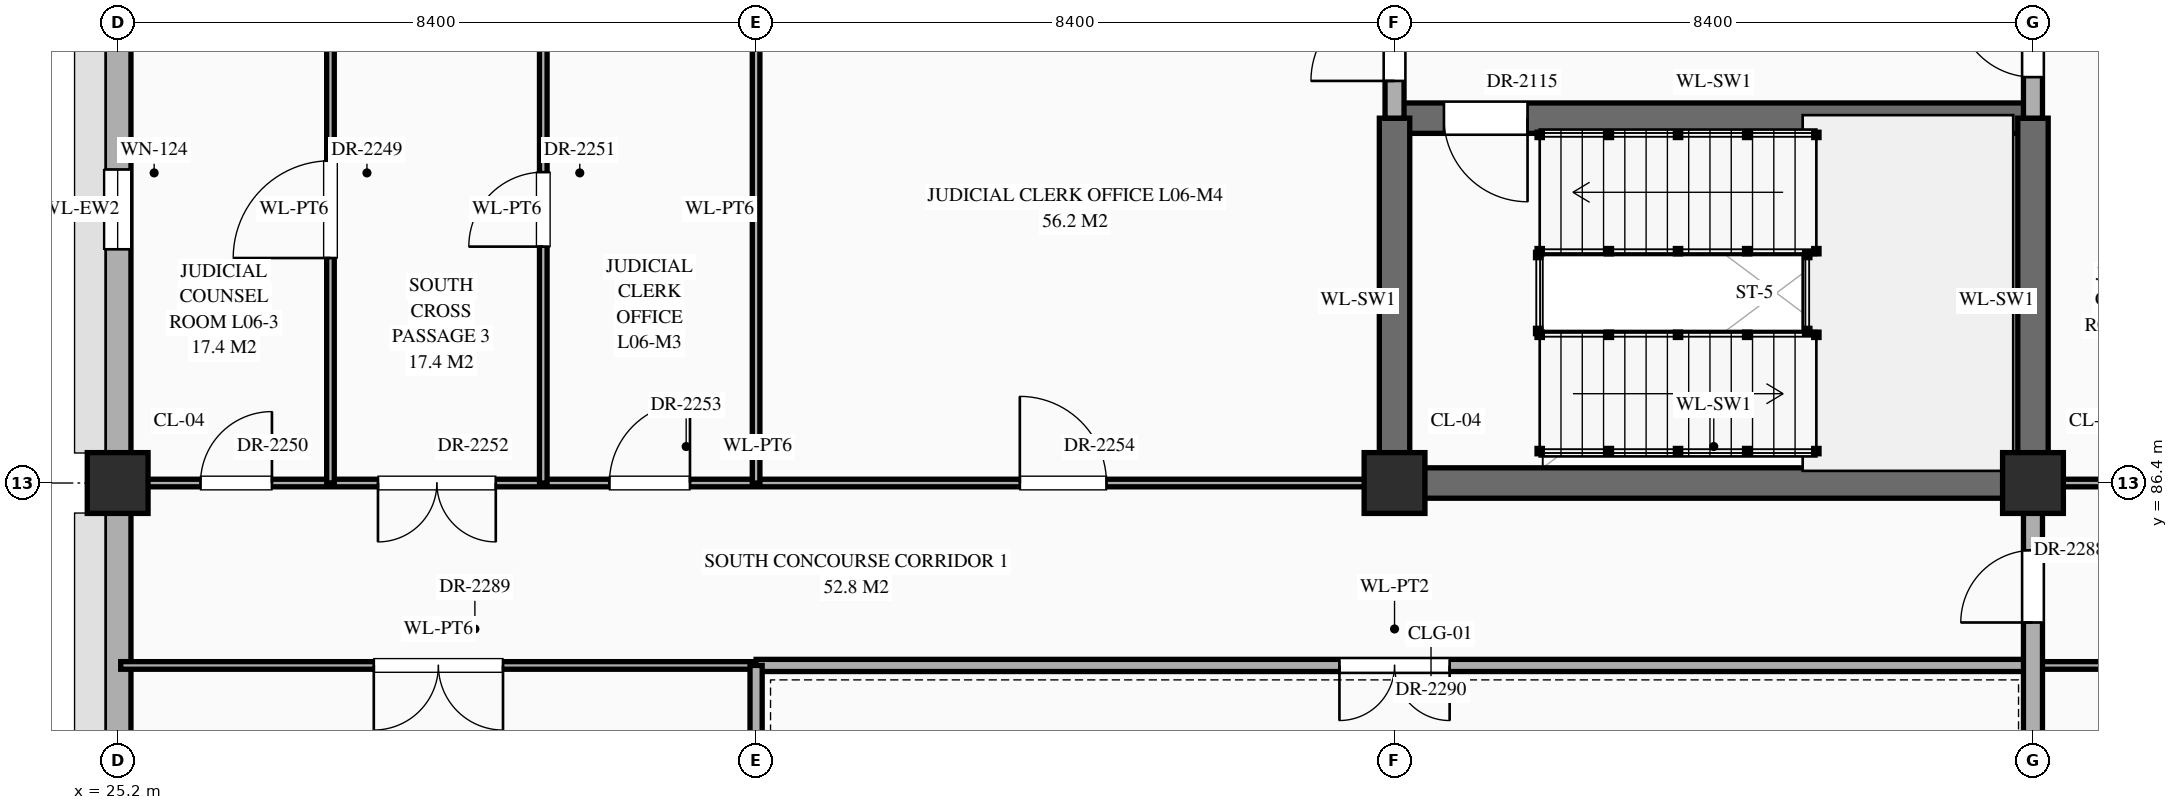
"""IFC4 building model, lengths in metres.
Left out: names, types, materials, properties, quantities, classifications, styles, units other than length and angle.
Written with IfcOpenShell. Run it as: python <this file> out.ifc"""

import sys

from ifc_helpers import new_model, si_unit, direction, frame, frame_2d, origin, origin_2d, place, context, subcontext, project, spatial, rectangle, extrude, element, fill, save


model = new_model("IFC4")
c1 = context("Model", 3, precision=1e-05, world=origin(), true_north=direction((0.0, 1.0)))
c2 = subcontext(c1, "Body", "Model", "MODEL_VIEW")
j1 = project(units=[si_unit("LENGTHUNIT", "METRE"), si_unit("PLANEANGLEUNIT", "RADIAN")], contexts=[c1])
p1 = place(None, origin())
s1 = spatial("IfcSite", under=j1, at=p1, CompositionType="ELEMENT")
p2 = place(p1, origin())
s2 = spatial("IfcBuilding", under=s1, at=p2, CompositionType="ELEMENT")
p3 = place(p2, frame((0.0, 0.0, 26.1)))
s3 = spatial("IfcBuildingStorey", under=s2, at=p3, CompositionType="ELEMENT", Elevation=26.1)
for number, where, z_axis, x_axis in (
    (1, (25.2, 86.4, 0.0), (0.0, 0.0, 1.0), (1.0, 0.0, 0.0)),
    (2, (42.0, 86.4, 0.0), (0.0, 0.0, 1.0), (1.0, 0.0, 0.0)),
    (3, (50.4, 86.4, 0.0), (0.0, 0.0, 1.0), (1.0, 0.0, 0.0)),
):
    element("IfcColumn", number, at=place(p3, frame(where, z_axis=z_axis, x_axis=x_axis)), inside=s3, PredefinedType="COLUMN", context=c2, shape_type="SweptSolid", body=[
        extrude(rectangle(XDim=0.8, YDim=0.8, at=origin_2d()), origin(), (0.0, 0.0, 1.0), 4.5),
    ])
p4 = place(p3, frame((25.2, 79.595, 0.0), z_axis=(0.0, 0.0, 1.0), x_axis=(0.0, 1.0, 0.0)))
e4 = element("IfcWall", 4, at=p4, inside=s3, PredefinedType="STANDARD", context=c2, shape_type="SweptSolid", body=[
    extrude(rectangle(XDim=6.41, YDim=0.35, at=frame_2d((3.205, 0.0))), origin(), (0.0, 0.0, 1.0), 3.59),
])
p5 = place(p4, frame((1.405, 0.0, 0.85)))
e5 = element("IfcOpeningElement", 5, at=p5, cuts=e4, PredefinedType="OPENING", context=c2, shape_type="SweptSolid", body=[
    extrude(rectangle(XDim=1.2, YDim=1.2, at=frame_2d((0.6, 0.6))), frame((0.0, 0.187, 0.0), z_axis=(0.0, -1.0, 0.0), x_axis=(1.0, 0.0, 0.0)), (0.0, 0.0, 1.0), 0.374),
])
p6 = place(p3, frame((25.2, 86.795, 0.0), z_axis=(0.0, 0.0, 1.0), x_axis=(0.0, 1.0, 0.0)))
e6 = element("IfcWall", 6, at=p6, inside=s3, PredefinedType="STANDARD", context=c2, shape_type="SweptSolid", body=[
    extrude(rectangle(XDim=6.41, YDim=0.35, at=frame_2d((3.205, 0.0))), origin(), (0.0, 0.0, 1.0), 3.59),
])
p7 = place(p6, frame((2.68, 0.0, 0.85)))
e7 = element("IfcOpeningElement", 7, at=p7, cuts=e6, PredefinedType="OPENING", context=c2, shape_type="SweptSolid", body=[
    extrude(rectangle(XDim=1.05, YDim=1.38, at=frame_2d((0.525, 0.69))), frame((0.0, 0.187, 0.0), z_axis=(0.0, -1.0, 0.0), x_axis=(1.0, 0.0, 0.0)), (0.0, 0.0, 1.0), 0.374),
])
p8 = place(p3, frame((25.24, 84.0, 0.0), z_axis=(0.0, 0.0, 1.0), x_axis=(1.0, 0.0, 0.0)))
e8 = element("IfcWall", 8, at=p8, inside=s3, PredefinedType="STANDARD", context=c2, shape_type="SweptSolid", body=[
    extrude(rectangle(XDim=8.36, YDim=0.1, at=frame_2d((4.18, 0.0))), origin(), (0.0, 0.0, 1.0), 4.24),
])
p9 = place(p8, frame((3.33, 0.0, 0.0)))
e9 = element("IfcOpeningElement", 9, at=p9, cuts=e8, PredefinedType="OPENING", context=c2, shape_type="SweptSolid", body=[
    extrude(rectangle(XDim=1.7, YDim=2.45, at=frame_2d((0.85, 1.225))), frame((0.0, 0.062, 0.0), z_axis=(0.0, -1.0, 0.0), x_axis=(1.0, 0.0, 0.0)), (0.0, 0.0, 1.0), 0.124),
])
p10 = place(p3, frame((33.6, 84.0, 0.0), z_axis=(0.0, 0.0, 1.0), x_axis=(1.0, 0.0, 0.0)))
e10 = element("IfcWall", 10, at=p10, inside=s3, PredefinedType="STANDARD", context=c2, shape_type="SweptSolid", body=[
    extrude(rectangle(XDim=16.8, YDim=0.16, at=frame_2d((8.4, 0.0))), origin(), (0.0, 0.0, 1.0), 4.24),
])
p11 = place(p10, frame((7.675, 0.0, 0.0)))
e11 = element("IfcOpeningElement", 11, at=p11, cuts=e10, PredefinedType="OPENING", context=c2, shape_type="SweptSolid", body=[
    extrude(rectangle(XDim=1.45, YDim=2.3, at=frame_2d((0.725, 1.15))), frame((0.0, 0.092, 0.0), z_axis=(0.0, -1.0, 0.0), x_axis=(1.0, 0.0, 0.0)), (0.0, 0.0, 1.0), 0.184),
])
p12 = place(p3, frame((50.4, 84.0, 0.0), z_axis=(0.0, 0.0, 1.0), x_axis=(1.0, 0.0, 0.0)))
e12 = element("IfcWall", 12, at=p12, inside=s3, PredefinedType="STANDARD", context=c2, shape_type="SweptSolid", body=[
    extrude(rectangle(XDim=16.8, YDim=0.1, at=frame_2d((8.4, 0.0))), origin(), (0.0, 0.0, 1.0), 4.24),
])
p13 = place(p12, frame((3.72, 0.0, 0.0)))
e13 = element("IfcOpeningElement", 13, at=p13, cuts=e12, PredefinedType="OPENING", context=c2, shape_type="SweptSolid", body=[
    extrude(rectangle(XDim=0.96, YDim=2.2, at=frame_2d((0.48, 1.1))), frame((0.0, 0.062, 0.0), z_axis=(0.0, -1.0, 0.0), x_axis=(1.0, 0.0, 0.0)), (0.0, 0.0, 1.0), 0.124),
])
p14 = place(p12, frame((12.1, 0.0, 0.0)))
e14 = element("IfcOpeningElement", 14, at=p14, cuts=e12, PredefinedType="OPENING", context=c2, shape_type="SweptSolid", body=[
    extrude(rectangle(XDim=1.0, YDim=2.25, at=frame_2d((0.5, 1.125))), frame((0.0, 0.062, 0.0), z_axis=(0.0, -1.0, 0.0), x_axis=(1.0, 0.0, 0.0)), (0.0, 0.0, 1.0), 0.124),
])
p15 = place(p3, frame((25.24, 86.4, 0.0), z_axis=(0.0, 0.0, 1.0), x_axis=(1.0, 0.0, 0.0)))
e15 = element("IfcWall", 15, at=p15, inside=s3, PredefinedType="STANDARD", context=c2, shape_type="SweptSolid", body=[
    extrude(rectangle(XDim=16.76, YDim=0.1, at=frame_2d((8.38, 0.0))), origin(), (0.0, 0.0, 1.0), 3.19),
])
p16 = place(p15, frame((1.05, 0.0, 0.0)))
e16 = element("IfcOpeningElement", 16, at=p16, cuts=e15, PredefinedType="OPENING", context=c2, shape_type="SweptSolid", body=[
    extrude(rectangle(XDim=0.94, YDim=2.3, at=frame_2d((0.47, 1.15))), frame((0.0, 0.062, 0.0), z_axis=(0.0, -1.0, 0.0), x_axis=(1.0, 0.0, 0.0)), (0.0, 0.0, 1.0), 0.124),
])
p17 = place(p15, frame((3.385, 0.0, 0.0)))
e17 = element("IfcOpeningElement", 17, at=p17, cuts=e15, PredefinedType="OPENING", context=c2, shape_type="SweptSolid", body=[
    extrude(rectangle(XDim=1.55, YDim=2.35, at=frame_2d((0.775, 1.175))), frame((0.0, 0.062, 0.0), z_axis=(0.0, -1.0, 0.0), x_axis=(1.0, 0.0, 0.0)), (0.0, 0.0, 1.0), 0.124),
])
p18 = place(p15, frame((6.43, 0.0, 0.0)))
e18 = element("IfcOpeningElement", 18, at=p18, cuts=e15, PredefinedType="OPENING", context=c2, shape_type="SweptSolid", body=[
    extrude(rectangle(XDim=1.06, YDim=2.4, at=frame_2d((0.53, 1.2))), frame((0.0, 0.062, 0.0), z_axis=(0.0, -1.0, 0.0), x_axis=(1.0, 0.0, 0.0)), (0.0, 0.0, 1.0), 0.124),
])
p19 = place(p15, frame((11.83, 0.0, 0.0)))
e19 = element("IfcOpeningElement", 19, at=p19, cuts=e15, PredefinedType="OPENING", context=c2, shape_type="SweptSolid", body=[
    extrude(rectangle(XDim=1.14, YDim=2.4, at=frame_2d((0.57, 1.2))), frame((0.0, 0.062, 0.0), z_axis=(0.0, -1.0, 0.0), x_axis=(1.0, 0.0, 0.0)), (0.0, 0.0, 1.0), 0.124),
])
p20 = place(p3, frame((42.0, 86.4, 0.0), z_axis=(0.0, 0.0, 1.0), x_axis=(1.0, 0.0, 0.0)))
e20 = element("IfcWall", 20, at=p20, inside=s3, PredefinedType="SHEAR", context=c2, shape_type="SweptSolid", body=[
    extrude(rectangle(XDim=8.4, YDim=0.4, at=frame_2d((4.2, 0.0))), origin(), (0.0, 0.0, 1.0), 4.24),
])
p21 = place(p3, frame((50.4, 86.4, 0.0), z_axis=(0.0, 0.0, 1.0), x_axis=(1.0, 0.0, 0.0)))
e21 = element("IfcWall", 21, at=p21, inside=s3, PredefinedType="STANDARD", context=c2, shape_type="SweptSolid", body=[
    extrude(rectangle(XDim=8.4, YDim=0.1, at=frame_2d((4.2, 0.0))), origin(), (0.0, 0.0, 1.0), 3.39),
])
p22 = place(p21, frame((1.13, 0.0, 0.0)))
e22 = element("IfcOpeningElement", 22, at=p22, cuts=e21, PredefinedType="OPENING", context=c2, shape_type="SweptSolid", body=[
    extrude(rectangle(XDim=0.86, YDim=2.1, at=frame_2d((0.43, 1.05))), frame((0.0, 0.062, 0.0), z_axis=(0.0, -1.0, 0.0), x_axis=(1.0, 0.0, 0.0)), (0.0, 0.0, 1.0), 0.124),
])
p23 = place(p21, frame((3.72, 0.0, 0.0)))
e23 = element("IfcOpeningElement", 23, at=p23, cuts=e21, PredefinedType="OPENING", context=c2, shape_type="SweptSolid", body=[
    extrude(rectangle(XDim=0.96, YDim=2.2, at=frame_2d((0.48, 1.1))), frame((0.0, 0.062, 0.0), z_axis=(0.0, -1.0, 0.0), x_axis=(1.0, 0.0, 0.0)), (0.0, 0.0, 1.0), 0.124),
])
p24 = place(p21, frame((6.34, 0.0, 0.0)))
e24 = element("IfcOpeningElement", 24, at=p24, cuts=e21, PredefinedType="OPENING", context=c2, shape_type="SweptSolid", body=[
    extrude(rectangle(XDim=1.0, YDim=2.25, at=frame_2d((0.5, 1.125))), frame((0.0, 0.062, 0.0), z_axis=(0.0, -1.0, 0.0), x_axis=(1.0, 0.0, 0.0)), (0.0, 0.0, 1.0), 0.124),
])
p25 = place(p3, frame((42.0, 91.2, 0.0), z_axis=(0.0, 0.0, 1.0), x_axis=(1.0, 0.0, 0.0)))
e25 = element("IfcWall", 25, at=p25, inside=s3, PredefinedType="SHEAR", context=c2, shape_type="SweptSolid", body=[
    extrude(rectangle(XDim=8.4, YDim=0.4, at=frame_2d((4.2, 0.0))), origin(), (0.0, 0.0, 1.0), 4.24),
])
p26 = place(p25, frame((0.65, 0.0, 0.0)))
e26 = element("IfcOpeningElement", 26, at=p26, cuts=e25, PredefinedType="OPENING", context=c2, shape_type="SweptSolid", body=[
    extrude(rectangle(XDim=1.1, YDim=2.2, at=frame_2d((0.55, 1.1))), frame((0.0, 0.212, 0.0), z_axis=(0.0, -1.0, 0.0), x_axis=(1.0, 0.0, 0.0)), (0.0, 0.0, 1.0), 0.424),
])
p27 = place(p3, frame((28.0, 86.4, 0.0), z_axis=(0.0, 0.0, 1.0), x_axis=(0.0, 1.0, 0.0)))
e27 = element("IfcWall", 27, at=p27, inside=s3, PredefinedType="STANDARD", context=c2, shape_type="SweptSolid", body=[
    extrude(rectangle(XDim=7.2, YDim=0.1, at=frame_2d((3.6, 0.0))), origin(), (0.0, 0.0, 1.0), 4.24),
])
p28 = place(p27, frame((2.96, 0.0, 0.0)))
e28 = element("IfcOpeningElement", 28, at=p28, cuts=e27, PredefinedType="OPENING", context=c2, shape_type="SweptSolid", body=[
    extrude(rectangle(XDim=1.28, YDim=2.35, at=frame_2d((0.64, 1.175))), frame((0.0, 0.062, 0.0), z_axis=(0.0, -1.0, 0.0), x_axis=(1.0, 0.0, 0.0)), (0.0, 0.0, 1.0), 0.124),
])
p29 = place(p3, frame((30.8, 86.4, 0.0), z_axis=(0.0, 0.0, 1.0), x_axis=(0.0, 1.0, 0.0)))
e29 = element("IfcWall", 29, at=p29, inside=s3, PredefinedType="STANDARD", context=c2, shape_type="SweptSolid", body=[
    extrude(rectangle(XDim=7.2, YDim=0.1, at=frame_2d((3.6, 0.0))), origin(), (0.0, 0.0, 1.0), 4.24),
])
p30 = place(p29, frame((3.11, 0.0, 0.0)))
e30 = element("IfcOpeningElement", 30, at=p30, cuts=e29, PredefinedType="OPENING", context=c2, shape_type="SweptSolid", body=[
    extrude(rectangle(XDim=0.98, YDim=2.35, at=frame_2d((0.49, 1.175))), frame((0.0, 0.062, 0.0), z_axis=(0.0, -1.0, 0.0), x_axis=(1.0, 0.0, 0.0)), (0.0, 0.0, 1.0), 0.124),
])
p31 = place(p3, frame((33.6, 79.24, 0.0), z_axis=(0.0, 0.0, 1.0), x_axis=(0.0, 1.0, 0.0)))
e31 = element("IfcWall", 31, at=p31, inside=s3, PredefinedType="STANDARD", context=c2, shape_type="SweptSolid", body=[
    extrude(rectangle(XDim=4.76, YDim=0.16, at=frame_2d((2.38, 0.0))), origin(), (0.0, 0.0, 1.0), 4.24),
])
p32 = place(p31, frame((1.67, 0.0, 0.0)))
e32 = element("IfcOpeningElement", 32, at=p32, cuts=e31, PredefinedType="OPENING", context=c2, shape_type="SweptSolid", body=[
    extrude(rectangle(XDim=1.7, YDim=2.45, at=frame_2d((0.85, 1.225))), frame((0.0, 0.092, 0.0), z_axis=(0.0, -1.0, 0.0), x_axis=(1.0, 0.0, 0.0)), (0.0, 0.0, 1.0), 0.184),
])
p33 = place(p3, frame((33.6, 86.4, 0.0), z_axis=(0.0, 0.0, 1.0), x_axis=(0.0, 1.0, 0.0)))
e33 = element("IfcWall", 33, at=p33, inside=s3, PredefinedType="STANDARD", context=c2, shape_type="SweptSolid", body=[
    extrude(rectangle(XDim=7.2, YDim=0.1, at=frame_2d((3.6, 0.0))), origin(), (0.0, 0.0, 1.0), 4.24),
])
p34 = place(p3, frame((42.0, 86.4, 0.0), z_axis=(0.0, 0.0, 1.0), x_axis=(0.0, 1.0, 0.0)))
e34 = element("IfcWall", 34, at=p34, inside=s3, PredefinedType="SHEAR", context=c2, shape_type="SweptSolid", body=[
    extrude(rectangle(XDim=4.8, YDim=0.4, at=frame_2d((2.4, 0.0))), origin(), (0.0, 0.0, 1.0), 4.24),
])
p35 = place(p3, frame((42.0, 91.2, 0.0), z_axis=(0.0, 0.0, 1.0), x_axis=(0.0, 1.0, 0.0)))
e35 = element("IfcWall", 35, at=p35, inside=s3, PredefinedType="STANDARD", context=c2, shape_type="SweptSolid", body=[
    extrude(rectangle(XDim=2.4, YDim=0.25, at=frame_2d((1.2, 0.0))), origin(), (0.0, 0.0, 1.0), 3.49),
])
p36 = place(p35, frame((0.49, 0.0, 0.0)))
e36 = element("IfcOpeningElement", 36, at=p36, cuts=e35, PredefinedType="OPENING", context=c2, shape_type="SweptSolid", body=[
    extrude(rectangle(XDim=1.1, YDim=2.2, at=frame_2d((0.55, 1.1))), frame((0.0, 0.137, 0.0), z_axis=(0.0, -1.0, 0.0), x_axis=(1.0, 0.0, 0.0)), (0.0, 0.0, 1.0), 0.274),
])
p37 = place(p3, frame((50.4, 79.24, 0.0), z_axis=(0.0, 0.0, 1.0), x_axis=(0.0, 1.0, 0.0)))
e37 = element("IfcWall", 37, at=p37, inside=s3, PredefinedType="STANDARD", context=c2, shape_type="SweptSolid", body=[
    extrude(rectangle(XDim=7.16, YDim=0.25, at=frame_2d((3.58, 0.0))), origin(), (0.0, 0.0, 1.0), 3.49),
])
p38 = place(p37, frame((5.325, 0.0, 0.0)))
e38 = element("IfcOpeningElement", 38, at=p38, cuts=e37, PredefinedType="OPENING", context=c2, shape_type="SweptSolid", body=[
    extrude(rectangle(XDim=0.95, YDim=2.15, at=frame_2d((0.475, 1.075))), frame((0.0, 0.137, 0.0), z_axis=(0.0, -1.0, 0.0), x_axis=(1.0, 0.0, 0.0)), (0.0, 0.0, 1.0), 0.274),
])
p39 = place(p3, frame((50.4, 86.4, 0.0), z_axis=(0.0, 0.0, 1.0), x_axis=(0.0, 1.0, 0.0)))
e39 = element("IfcWall", 39, at=p39, inside=s3, PredefinedType="SHEAR", context=c2, shape_type="SweptSolid", body=[
    extrude(rectangle(XDim=4.8, YDim=0.4, at=frame_2d((2.4, 0.0))), origin(), (0.0, 0.0, 1.0), 4.24),
])
p40 = place(p3, frame((50.4, 91.2, 0.0), z_axis=(0.0, 0.0, 1.0), x_axis=(0.0, 1.0, 0.0)))
e40 = element("IfcWall", 40, at=p40, inside=s3, PredefinedType="STANDARD", context=c2, shape_type="SweptSolid", body=[
    extrude(rectangle(XDim=13.2, YDim=0.25, at=frame_2d((6.6, 0.0))), origin(), (0.0, 0.0, 1.0), 3.49),
])
p41 = place(p40, frame((0.54, 0.0, 0.0)))
e41 = element("IfcOpeningElement", 41, at=p41, cuts=e40, PredefinedType="OPENING", context=c2, shape_type="SweptSolid", body=[
    extrude(rectangle(XDim=1.0, YDim=2.2, at=frame_2d((0.5, 1.1))), frame((0.0, 0.137, 0.0), z_axis=(0.0, -1.0, 0.0), x_axis=(1.0, 0.0, 0.0)), (0.0, 0.0, 1.0), 0.274),
])
p42 = place(p40, frame((10.41, 0.0, 0.0)))
e42 = element("IfcOpeningElement", 42, at=p42, cuts=e40, PredefinedType="OPENING", context=c2, shape_type="SweptSolid", body=[
    extrude(rectangle(XDim=1.1, YDim=2.2, at=frame_2d((0.55, 1.1))), frame((0.0, 0.137, 0.0), z_axis=(0.0, -1.0, 0.0), x_axis=(1.0, 0.0, 0.0)), (0.0, 0.0, 1.0), 0.274),
])
p43 = place(p40, frame((3.285, 0.0, 0.0)))
e43 = element("IfcOpeningElement", 43, at=p43, cuts=e40, PredefinedType="OPENING", context=c2, shape_type="SweptSolid", body=[
    extrude(rectangle(XDim=0.95, YDim=2.15, at=frame_2d((0.475, 1.075))), frame((0.0, 0.137, 0.0), z_axis=(0.0, -1.0, 0.0), x_axis=(1.0, 0.0, 0.0)), (0.0, 0.0, 1.0), 0.274),
])
p44 = place(p7, origin())
e44 = element("IfcWindow", 44, at=p44, inside=s3, PartitioningType="SINGLE_PANEL", PredefinedType="WINDOW", context=c2, shape_type="SweptSolid", body=[
    extrude(rectangle(XDim=1.05, YDim=1.38, at=frame_2d((0.525, 0.69))), frame((0.0, 0.03, 0.0), z_axis=(0.0, -1.0, 0.0), x_axis=(1.0, 0.0, 0.0)), (0.0, 0.0, 1.0), 0.06),
])
fill(e7, e44)
p45 = place(p26, frame((1.1, 0.0, 0.0), z_axis=(0.0, 0.0, 1.0), x_axis=(-1.0, 0.0, 0.0)))
e45 = element("IfcDoor", 45, at=p45, inside=s3, OperationType="SINGLE_SWING_LEFT", PredefinedType="DOOR", context=c2, shape_type="SweptSolid", body=[
    extrude(rectangle(XDim=1.1, YDim=2.2, at=frame_2d((0.55, 1.1))), frame((0.0, 0.025, 0.0), z_axis=(0.0, -1.0, 0.0), x_axis=(1.0, 0.0, 0.0)), (0.0, 0.0, 1.0), 0.05),
])
fill(e26, e45)
p46 = place(p36, origin())
e46 = element("IfcDoor", 46, at=p46, inside=s3, OperationType="SINGLE_SWING_LEFT", PredefinedType="DOOR", context=c2, shape_type="SweptSolid", body=[
    extrude(rectangle(XDim=1.1, YDim=2.2, at=frame_2d((0.55, 1.1))), frame((0.0, 0.025, 0.0), z_axis=(0.0, -1.0, 0.0), x_axis=(1.0, 0.0, 0.0)), (0.0, 0.0, 1.0), 0.05),
])
fill(e36, e46)
p47 = place(p41, origin())
e47 = element("IfcDoor", 47, at=p47, inside=s3, OperationType="SINGLE_SWING_RIGHT", PredefinedType="DOOR", context=c2, shape_type="SweptSolid", body=[
    extrude(rectangle(XDim=1.0, YDim=2.2, at=frame_2d((0.5, 1.1))), frame((0.0, 0.025, 0.0), z_axis=(0.0, -1.0, 0.0), x_axis=(1.0, 0.0, 0.0)), (0.0, 0.0, 1.0), 0.05),
])
fill(e41, e47)
p48 = place(p28, origin())
e48 = element("IfcDoor", 48, at=p48, inside=s3, OperationType="SINGLE_SWING_LEFT", PredefinedType="DOOR", context=c2, shape_type="SweptSolid", body=[
    extrude(rectangle(XDim=1.28, YDim=2.35, at=frame_2d((0.64, 1.175))), frame((0.0, 0.025, 0.0), z_axis=(0.0, -1.0, 0.0), x_axis=(1.0, 0.0, 0.0)), (0.0, 0.0, 1.0), 0.05),
])
fill(e28, e48)
p49 = place(p16, origin())
e49 = element("IfcDoor", 49, at=p49, inside=s3, OperationType="SINGLE_SWING_RIGHT", PredefinedType="DOOR", context=c2, shape_type="SweptSolid", body=[
    extrude(rectangle(XDim=0.94, YDim=2.3, at=frame_2d((0.47, 1.15))), frame((0.0, 0.025, 0.0), z_axis=(0.0, -1.0, 0.0), x_axis=(1.0, 0.0, 0.0)), (0.0, 0.0, 1.0), 0.05),
])
fill(e16, e49)
p50 = place(p30, origin())
e50 = element("IfcDoor", 50, at=p50, inside=s3, OperationType="SINGLE_SWING_LEFT", PredefinedType="DOOR", context=c2, shape_type="SweptSolid", body=[
    extrude(rectangle(XDim=0.98, YDim=2.35, at=frame_2d((0.49, 1.175))), frame((0.0, 0.025, 0.0), z_axis=(0.0, -1.0, 0.0), x_axis=(1.0, 0.0, 0.0)), (0.0, 0.0, 1.0), 0.05),
])
fill(e30, e50)
p51 = place(p17, frame((1.55, 0.0, 0.0), z_axis=(0.0, 0.0, 1.0), x_axis=(-1.0, 0.0, 0.0)))
e51 = element("IfcDoor", 51, at=p51, inside=s3, OperationType="DOUBLE_DOOR_SINGLE_SWING", PredefinedType="DOOR", context=c2, shape_type="SweptSolid", body=[
    extrude(rectangle(XDim=1.55, YDim=2.35, at=frame_2d((0.775, 1.175))), frame((0.0, 0.025, 0.0), z_axis=(0.0, -1.0, 0.0), x_axis=(1.0, 0.0, 0.0)), (0.0, 0.0, 1.0), 0.05),
])
fill(e17, e51)
p52 = place(p18, origin())
e52 = element("IfcDoor", 52, at=p52, inside=s3, OperationType="SINGLE_SWING_RIGHT", PredefinedType="DOOR", context=c2, shape_type="SweptSolid", body=[
    extrude(rectangle(XDim=1.06, YDim=2.4, at=frame_2d((0.53, 1.2))), frame((0.0, 0.025, 0.0), z_axis=(0.0, -1.0, 0.0), x_axis=(1.0, 0.0, 0.0)), (0.0, 0.0, 1.0), 0.05),
])
fill(e18, e52)
p53 = place(p19, origin())
e53 = element("IfcDoor", 53, at=p53, inside=s3, OperationType="SINGLE_SWING_LEFT", PredefinedType="DOOR", context=c2, shape_type="SweptSolid", body=[
    extrude(rectangle(XDim=1.14, YDim=2.4, at=frame_2d((0.57, 1.2))), frame((0.0, 0.025, 0.0), z_axis=(0.0, -1.0, 0.0), x_axis=(1.0, 0.0, 0.0)), (0.0, 0.0, 1.0), 0.05),
])
fill(e19, e53)
p54 = place(p38, origin())
e54 = element("IfcDoor", 54, at=p54, inside=s3, OperationType="SINGLE_SWING_LEFT", PredefinedType="DOOR", context=c2, shape_type="SweptSolid", body=[
    extrude(rectangle(XDim=0.95, YDim=2.15, at=frame_2d((0.475, 1.075))), frame((0.0, 0.025, 0.0), z_axis=(0.0, -1.0, 0.0), x_axis=(1.0, 0.0, 0.0)), (0.0, 0.0, 1.0), 0.05),
])
fill(e38, e54)
p55 = place(p9, frame((1.7, 0.0, 0.0), z_axis=(0.0, 0.0, 1.0), x_axis=(-1.0, 0.0, 0.0)))
e55 = element("IfcDoor", 55, at=p55, inside=s3, OperationType="DOUBLE_DOOR_SINGLE_SWING", PredefinedType="DOOR", context=c2, shape_type="SweptSolid", body=[
    extrude(rectangle(XDim=1.7, YDim=2.45, at=frame_2d((0.85, 1.225))), frame((0.0, 0.025, 0.0), z_axis=(0.0, -1.0, 0.0), x_axis=(1.0, 0.0, 0.0)), (0.0, 0.0, 1.0), 0.05),
])
fill(e9, e55)
p56 = place(p11, frame((1.45, 0.0, 0.0), z_axis=(0.0, 0.0, 1.0), x_axis=(-1.0, 0.0, 0.0)))
e56 = element("IfcDoor", 56, at=p56, inside=s3, OperationType="DOUBLE_DOOR_SINGLE_SWING", PredefinedType="DOOR", context=c2, shape_type="SweptSolid", body=[
    extrude(rectangle(XDim=1.45, YDim=2.3, at=frame_2d((0.725, 1.15))), frame((0.0, 0.025, 0.0), z_axis=(0.0, -1.0, 0.0), x_axis=(1.0, 0.0, 0.0)), (0.0, 0.0, 1.0), 0.05),
])
fill(e11, e56)
save(model, sys.argv[1])
